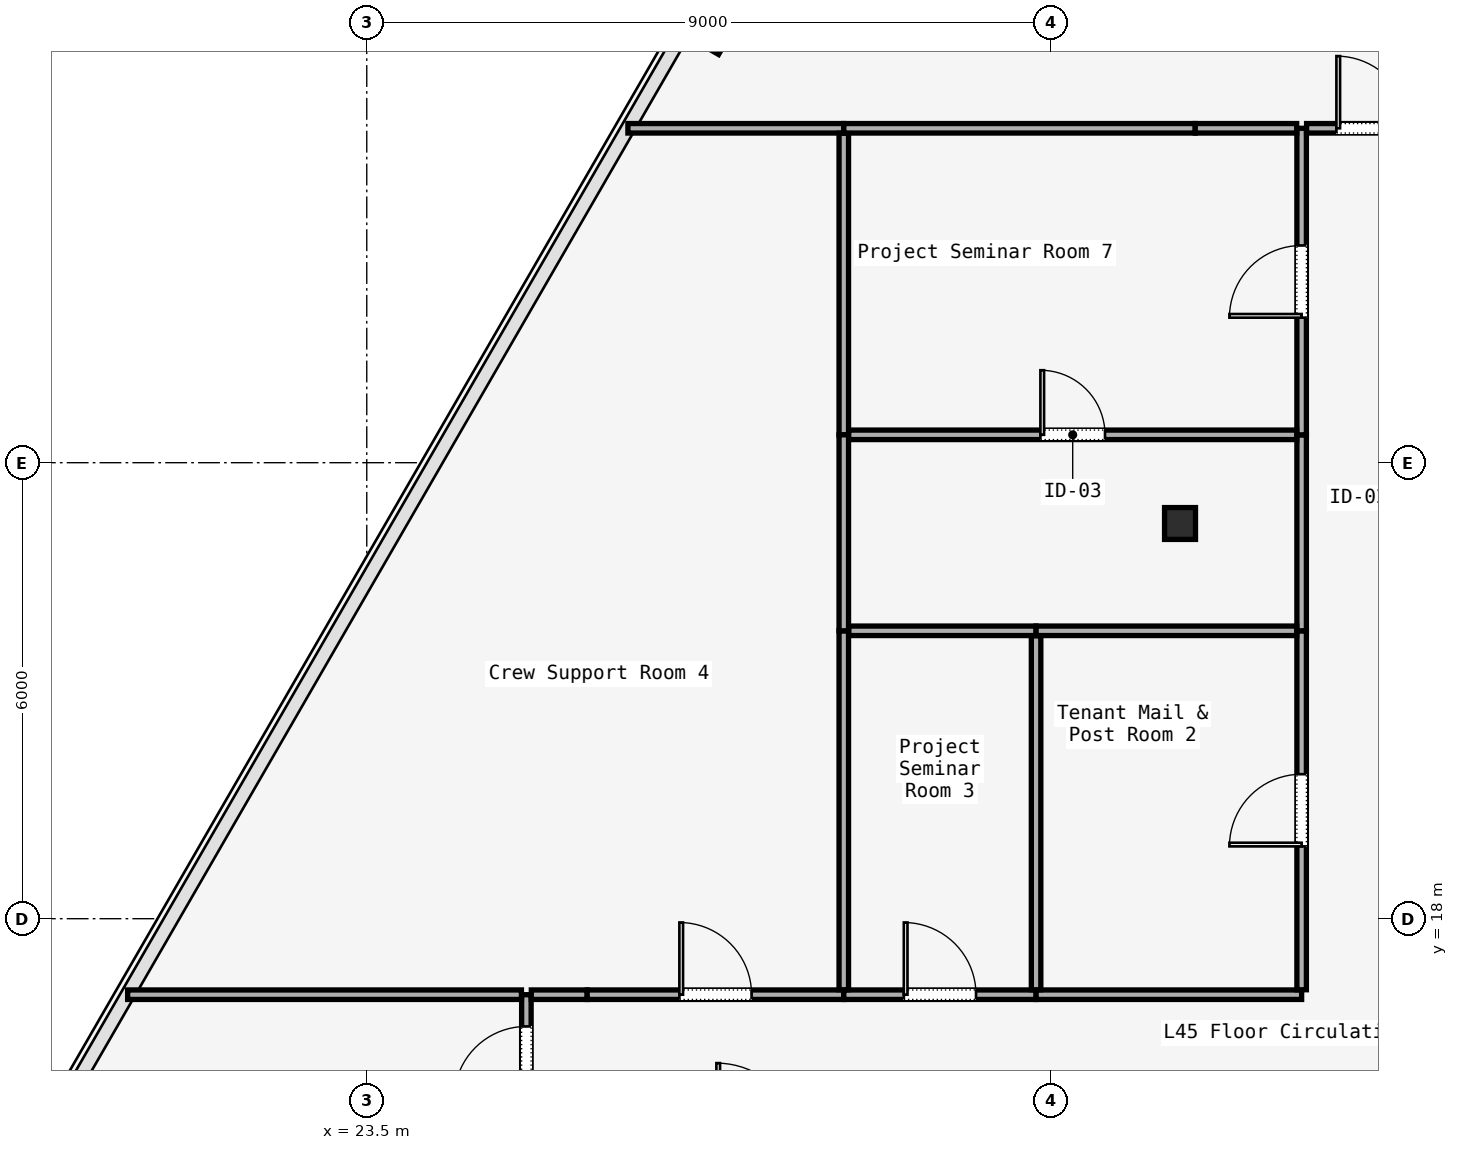
"""IFC4 building model, lengths in metres.
Left out: names, types, materials, properties, quantities, classifications, styles, units other than length and angle.
Written with IfcOpenShell. Run it as: python <this file> out.ifc"""

import sys

from ifc_helpers import new_model, si_unit, direction, frame, frame_2d, origin, origin_2d, place, context, subcontext, project, spatial, rectangle, i_section, extrude, element, fill, save


model = new_model("IFC4")
c1 = context("Model", 3, precision=1e-05, world=origin(), true_north=direction((0.0, 1.0)))
c2 = subcontext(c1, "Body", "Model", "MODEL_VIEW")
j1 = project(units=[si_unit("LENGTHUNIT", "METRE"), si_unit("PLANEANGLEUNIT", "RADIAN")], contexts=[c1])
p1 = place(None, origin())
s1 = spatial("IfcSite", under=j1, at=p1, CompositionType="ELEMENT")
p2 = place(p1, origin())
s2 = spatial("IfcBuilding", under=s1, at=p2, CompositionType="ELEMENT")
p3 = place(p2, frame((0.0, 0.0, 187.8)))
s3 = spatial("IfcBuildingStorey", under=s2, at=p3, CompositionType="ELEMENT", Elevation=187.8)
p4 = place(p3, frame((34.2, 23.2, 0.0), z_axis=(0.0, 0.0, 1.0), x_axis=(1.0, 0.0, 0.0)))
e1 = element("IfcColumn", 1, at=p4, inside=s3, PredefinedType="COLUMN", context=c2, shape_type="SweptSolid", body=[
    extrude(i_section(OverallWidth=0.407, OverallDepth=0.419, WebThickness=0.031, FlangeThickness=0.049, FilletRadius=0.015, at=origin_2d()), origin(), (0.0, 0.0, 1.0), 3.58),
])
p5 = place(p3, frame((28.036, 29.666, 0.0), z_axis=(0.042672352405, -0.073997120652, 0.996345068977), x_axis=(0.002087206944, 0.997257873333, 0.073975520569)))
e2 = element("IfcColumn", 2, at=p5, inside=s3, PredefinedType="COLUMN", context=c2, shape_type="SweptSolid", body=[
    extrude(i_section(OverallWidth=0.418, OverallDepth=0.455, WebThickness=0.042, FlangeThickness=0.052, FilletRadius=0.015, at=origin_2d()), origin(), (0.0, 0.0, 1.0), 3.593),
])
p6 = place(p3, frame((25.6, 15.215, 0.0), z_axis=(0.0, 0.0, 1.0), x_axis=(0.0, 1.0, 0.0)))
e3 = element("IfcWall", 3, at=p6, inside=s3, PredefinedType="PARTITIONING", context=c2, shape_type="SweptSolid", body=[
    extrude(rectangle(XDim=1.785, YDim=0.125, at=frame_2d((0.893, 0.0))), origin(), (0.0, 0.0, 1.0), 3.01),
])
p7 = place(p6, frame((0.417, 0.0, 0.0)))
e4 = element("IfcOpeningElement", 4, at=p7, cuts=e3, PredefinedType="OPENING", context=c2, shape_type="SweptSolid", body=[
    extrude(rectangle(XDim=0.95, YDim=2.2, at=frame_2d((0.475, 1.1))), frame((0.0, 0.062, 0.0), z_axis=(0.0, -1.0, 0.0), x_axis=(1.0, 0.0, 0.0)), (0.0, 0.0, 1.0), 0.125),
])
p8 = place(p3, frame((25.665, 17.0, 0.0), z_axis=(0.0, 0.0, 1.0), x_axis=(1.0, 0.0, 0.0)))
e5 = element("IfcWall", 5, at=p8, inside=s3, PredefinedType="PARTITIONING", context=c2, shape_type="SweptSolid", body=[
    extrude(rectangle(XDim=0.735, YDim=0.125, at=frame_2d((0.367, 0.0))), origin(), (0.0, 0.0, 1.0), 3.01),
])
p9 = place(p3, frame((26.4, 17.0, 0.0), z_axis=(0.0, 0.0, 1.0), x_axis=(1.0, 0.0, 0.0)))
e6 = element("IfcWall", 6, at=p9, inside=s3, PredefinedType="PARTITIONING", context=c2, shape_type="SweptSolid", body=[
    extrude(rectangle(XDim=3.376, YDim=0.125, at=frame_2d((1.688, 0.0))), origin(), (0.0, 0.0, 1.0), 3.01),
])
p10 = place(p9, frame((1.213, 0.0, 0.0)))
e7 = element("IfcOpeningElement", 7, at=p10, cuts=e6, PredefinedType="OPENING", context=c2, shape_type="SweptSolid", body=[
    extrude(rectangle(XDim=0.95, YDim=2.2, at=frame_2d((0.475, 1.1))), frame((0.0, 0.062, 0.0), z_axis=(0.0, -1.0, 0.0), x_axis=(1.0, 0.0, 0.0)), (0.0, 0.0, 1.0), 0.125),
])
p11 = place(p3, frame((29.776, 17.0, 0.0), z_axis=(0.0, 0.0, 1.0), x_axis=(1.0, 0.0, 0.0)))
e8 = element("IfcWall", 8, at=p11, inside=s3, PredefinedType="PARTITIONING", context=c2, shape_type="SweptSolid", body=[
    extrude(rectangle(XDim=2.53, YDim=0.125, at=frame_2d((1.265, 0.0))), origin(), (0.0, 0.0, 1.0), 3.01),
])
p12 = place(p11, frame((0.79, 0.0, 0.0)))
e9 = element("IfcOpeningElement", 9, at=p12, cuts=e8, PredefinedType="OPENING", context=c2, shape_type="SweptSolid", body=[
    extrude(rectangle(XDim=0.95, YDim=2.2, at=frame_2d((0.475, 1.1))), frame((0.0, 0.062, 0.0), z_axis=(0.0, -1.0, 0.0), x_axis=(1.0, 0.0, 0.0)), (0.0, 0.0, 1.0), 0.125),
])
p13 = place(p3, frame((32.306, 17.0, 0.0), z_axis=(0.0, 0.0, 1.0), x_axis=(1.0, 0.0, 0.0)))
e10 = element("IfcWall", 10, at=p13, inside=s3, PredefinedType="PARTITIONING", context=c2, shape_type="SweptSolid", body=[
    extrude(rectangle(XDim=3.494, YDim=0.125, at=frame_2d((1.747, 0.0))), origin(), (0.0, 0.0, 1.0), 3.01),
])
p14 = place(p3, frame((35.8, 17.065, 0.0), z_axis=(0.0, 0.0, 1.0), x_axis=(0.0, 1.0, 0.0)))
e11 = element("IfcWall", 11, at=p14, inside=s3, PredefinedType="PARTITIONING", context=c2, shape_type="SweptSolid", body=[
    extrude(rectangle(XDim=4.723, YDim=0.125, at=frame_2d((2.362, 0.0))), origin(), (0.0, 0.0, 1.0), 3.01),
])
p15 = place(p14, frame((1.886, 0.0, 0.0)))
e12 = element("IfcOpeningElement", 12, at=p15, cuts=e11, PredefinedType="OPENING", context=c2, shape_type="SweptSolid", body=[
    extrude(rectangle(XDim=0.95, YDim=2.2, at=frame_2d((0.475, 1.1))), frame((0.0, 0.062, 0.0), z_axis=(0.0, -1.0, 0.0), x_axis=(1.0, 0.0, 0.0)), (0.0, 0.0, 1.0), 0.125),
])
p16 = place(p3, frame((35.8, 21.788, 0.0), z_axis=(0.0, 0.0, 1.0), x_axis=(0.0, 1.0, 0.0)))
e13 = element("IfcWall", 13, at=p16, inside=s3, PredefinedType="PARTITIONING", context=c2, shape_type="SweptSolid", body=[
    extrude(rectangle(XDim=2.579, YDim=0.125, at=frame_2d((1.289, 0.0))), origin(), (0.0, 0.0, 1.0), 3.01),
])
p17 = place(p3, frame((35.8, 24.367, 0.0), z_axis=(0.0, 0.0, 1.0), x_axis=(0.0, 1.0, 0.0)))
e14 = element("IfcWall", 14, at=p17, inside=s3, PredefinedType="PARTITIONING", context=c2, shape_type="SweptSolid", body=[
    extrude(rectangle(XDim=4.033, YDim=0.125, at=frame_2d((2.017, 0.0))), origin(), (0.0, 0.0, 1.0), 3.01),
])
p18 = place(p17, frame((1.542, 0.0, 0.0)))
e15 = element("IfcOpeningElement", 15, at=p18, cuts=e14, PredefinedType="OPENING", context=c2, shape_type="SweptSolid", body=[
    extrude(rectangle(XDim=0.95, YDim=2.2, at=frame_2d((0.475, 1.1))), frame((0.0, 0.062, 0.0), z_axis=(0.0, -1.0, 0.0), x_axis=(1.0, 0.0, 0.0)), (0.0, 0.0, 1.0), 0.125),
])
p19 = place(p3, frame((35.865, 28.4, 0.0), z_axis=(0.0, 0.0, 1.0), x_axis=(1.0, 0.0, 0.0)))
e16 = element("IfcWall", 16, at=p19, inside=s3, PredefinedType="PARTITIONING", context=c2, shape_type="SweptSolid", body=[
    extrude(rectangle(XDim=1.735, YDim=0.125, at=frame_2d((0.868, 0.0))), origin(), (0.0, 0.0, 1.0), 3.01),
])
p20 = place(p19, frame((0.393, 0.0, 0.0)))
e17 = element("IfcOpeningElement", 17, at=p20, cuts=e16, PredefinedType="OPENING", context=c2, shape_type="SweptSolid", body=[
    extrude(rectangle(XDim=0.95, YDim=2.2, at=frame_2d((0.475, 1.1))), frame((0.0, 0.062, 0.0), z_axis=(0.0, -1.0, 0.0), x_axis=(1.0, 0.0, 0.0)), (0.0, 0.0, 1.0), 0.125),
])
p21 = place(p3, frame((20.354, 17.0, 0.0), z_axis=(0.0, 0.0, 1.0), x_axis=(1.0, 0.0, 0.0)))
e18 = element("IfcWall", 18, at=p21, inside=s3, PredefinedType="PARTITIONING", context=c2, shape_type="SweptSolid", body=[
    extrude(rectangle(XDim=5.181, YDim=0.125, at=frame_2d((2.59, 0.0))), origin(), (0.0, 0.0, 1.0), 3.01),
])
p22 = place(p3, frame((29.776, 17.065, 0.0), z_axis=(0.0, 0.0, 1.0), x_axis=(0.0, 1.0, 0.0)))
e19 = element("IfcWall", 19, at=p22, inside=s3, PredefinedType="PARTITIONING", context=c2, shape_type="SweptSolid", body=[
    extrude(rectangle(XDim=4.723, YDim=0.125, at=frame_2d((2.362, 0.0))), origin(), (0.0, 0.0, 1.0), 3.01),
])
p23 = place(p3, frame((29.841, 21.788, 0.0), z_axis=(0.0, 0.0, 1.0), x_axis=(1.0, 0.0, 0.0)))
e20 = element("IfcWall", 20, at=p23, inside=s3, PredefinedType="PARTITIONING", context=c2, shape_type="SweptSolid", body=[
    extrude(rectangle(XDim=2.465, YDim=0.125, at=frame_2d((1.232, 0.0))), origin(), (0.0, 0.0, 1.0), 3.01),
])
p24 = place(p3, frame((32.306, 21.723, 0.0), z_axis=(0.0, 0.0, 1.0), x_axis=(0.0, -1.0, 0.0)))
e21 = element("IfcWall", 21, at=p24, inside=s3, PredefinedType="PARTITIONING", context=c2, shape_type="SweptSolid", body=[
    extrude(rectangle(XDim=4.658, YDim=0.125, at=frame_2d((2.329, 0.0))), origin(), (0.0, 0.0, 1.0), 3.01),
])
p25 = place(p3, frame((32.306, 21.788, 0.0), z_axis=(0.0, 0.0, 1.0), x_axis=(1.0, 0.0, 0.0)))
e22 = element("IfcWall", 22, at=p25, inside=s3, PredefinedType="PARTITIONING", context=c2, shape_type="SweptSolid", body=[
    extrude(rectangle(XDim=3.429, YDim=0.125, at=frame_2d((1.714, 0.0))), origin(), (0.0, 0.0, 1.0), 3.01),
])
p26 = place(p3, frame((26.936, 28.4, 0.0), z_axis=(0.0, 0.0, 1.0), x_axis=(1.0, 0.0, 0.0)))
e23 = element("IfcWall", 23, at=p26, inside=s3, PredefinedType="PARTITIONING", context=c2, shape_type="SweptSolid", body=[
    extrude(rectangle(XDim=2.84, YDim=0.125, at=frame_2d((1.42, 0.0))), origin(), (0.0, 0.0, 1.0), 3.01),
])
p27 = place(p3, frame((29.776, 28.335, 0.0), z_axis=(0.0, 0.0, 1.0), x_axis=(0.0, -1.0, 0.0)))
e24 = element("IfcWall", 24, at=p27, inside=s3, PredefinedType="PARTITIONING", context=c2, shape_type="SweptSolid", body=[
    extrude(rectangle(XDim=3.968, YDim=0.125, at=frame_2d((1.984, 0.0))), origin(), (0.0, 0.0, 1.0), 3.01),
])
p28 = place(p3, frame((29.776, 24.367, 0.0), z_axis=(0.0, 0.0, 1.0), x_axis=(0.0, -1.0, 0.0)))
e25 = element("IfcWall", 25, at=p28, inside=s3, PredefinedType="PARTITIONING", context=c2, shape_type="SweptSolid", body=[
    extrude(rectangle(XDim=2.579, YDim=0.125, at=frame_2d((1.289, 0.0))), origin(), (0.0, 0.0, 1.0), 3.01),
])
p29 = place(p3, frame((29.841, 24.367, 0.0), z_axis=(0.0, 0.0, 1.0), x_axis=(1.0, 0.0, 0.0)))
e26 = element("IfcWall", 26, at=p29, inside=s3, PredefinedType="PARTITIONING", context=c2, shape_type="SweptSolid", body=[
    extrude(rectangle(XDim=5.894, YDim=0.125, at=frame_2d((2.947, 0.0))), origin(), (0.0, 0.0, 1.0), 3.01),
])
p30 = place(p29, frame((2.522, 0.0, 0.0)))
e27 = element("IfcOpeningElement", 27, at=p30, cuts=e26, PredefinedType="OPENING", context=c2, shape_type="SweptSolid", body=[
    extrude(rectangle(XDim=0.85, YDim=2.15, at=frame_2d((0.425, 1.075))), frame((0.0, 0.062, 0.0), z_axis=(0.0, -1.0, 0.0), x_axis=(1.0, 0.0, 0.0)), (0.0, 0.0, 1.0), 0.125),
])
p31 = place(p3, frame((29.776, 28.4, 0.0), z_axis=(0.0, 0.0, 1.0), x_axis=(1.0, 0.0, 0.0)))
e28 = element("IfcWall", 28, at=p31, inside=s3, PredefinedType="PARTITIONING", context=c2, shape_type="SweptSolid", body=[
    extrude(rectangle(XDim=4.624, YDim=0.125, at=frame_2d((2.312, 0.0))), origin(), (0.0, 0.0, 1.0), 3.01),
])
p32 = place(p3, frame((34.4, 28.4, 0.0), z_axis=(0.0, 0.0, 1.0), x_axis=(1.0, 0.0, 0.0)))
e29 = element("IfcWall", 29, at=p32, inside=s3, PredefinedType="PARTITIONING", context=c2, shape_type="SweptSolid", body=[
    extrude(rectangle(XDim=1.335, YDim=0.125, at=frame_2d((0.667, 0.0))), origin(), (0.0, 0.0, 1.0), 3.01),
])
p33 = place(p7, origin())
e30 = element("IfcDoor", 30, at=p33, inside=s3, OperationType="SINGLE_SWING_RIGHT", PredefinedType="DOOR", context=c2, shape_type="SweptSolid", body=[
    extrude(rectangle(XDim=0.95, YDim=2.2, at=frame_2d((0.475, 1.1))), frame((0.0, 0.025, 0.0), z_axis=(0.0, -1.0, 0.0), x_axis=(1.0, 0.0, 0.0)), (0.0, 0.0, 1.0), 0.05),
])
fill(e4, e30)
p34 = place(p12, origin())
e31 = element("IfcDoor", 31, at=p34, inside=s3, OperationType="SINGLE_SWING_LEFT", PredefinedType="DOOR", context=c2, shape_type="SweptSolid", body=[
    extrude(rectangle(XDim=0.95, YDim=2.2, at=frame_2d((0.475, 1.1))), frame((0.0, 0.025, 0.0), z_axis=(0.0, -1.0, 0.0), x_axis=(1.0, 0.0, 0.0)), (0.0, 0.0, 1.0), 0.05),
])
fill(e9, e31)
p35 = place(p15, origin())
e32 = element("IfcDoor", 32, at=p35, inside=s3, OperationType="SINGLE_SWING_RIGHT", PredefinedType="DOOR", context=c2, shape_type="SweptSolid", body=[
    extrude(rectangle(XDim=0.95, YDim=2.2, at=frame_2d((0.475, 1.1))), frame((0.0, 0.025, 0.0), z_axis=(0.0, -1.0, 0.0), x_axis=(1.0, 0.0, 0.0)), (0.0, 0.0, 1.0), 0.05),
])
fill(e12, e32)
p36 = place(p10, origin())
e33 = element("IfcDoor", 33, at=p36, inside=s3, OperationType="SINGLE_SWING_LEFT", PredefinedType="DOOR", context=c2, shape_type="SweptSolid", body=[
    extrude(rectangle(XDim=0.95, YDim=2.2, at=frame_2d((0.475, 1.1))), frame((0.0, 0.025, 0.0), z_axis=(0.0, -1.0, 0.0), x_axis=(1.0, 0.0, 0.0)), (0.0, 0.0, 1.0), 0.05),
])
fill(e7, e33)
p37 = place(p30, origin())
e34 = element("IfcDoor", 34, at=p37, inside=s3, OperationType="SINGLE_SWING_LEFT", PredefinedType="DOOR", context=c2, shape_type="SweptSolid", body=[
    extrude(rectangle(XDim=0.85, YDim=2.15, at=frame_2d((0.425, 1.075))), frame((0.0, 0.025, 0.0), z_axis=(0.0, -1.0, 0.0), x_axis=(1.0, 0.0, 0.0)), (0.0, 0.0, 1.0), 0.05),
])
fill(e27, e34)
p38 = place(p18, origin())
e35 = element("IfcDoor", 35, at=p38, inside=s3, OperationType="SINGLE_SWING_LEFT", PredefinedType="DOOR", context=c2, shape_type="SweptSolid", body=[
    extrude(rectangle(XDim=0.95, YDim=2.2, at=frame_2d((0.475, 1.1))), frame((0.0, 0.025, 0.0), z_axis=(0.0, -1.0, 0.0), x_axis=(1.0, 0.0, 0.0)), (0.0, 0.0, 1.0), 0.05),
])
fill(e15, e35)
p39 = place(p20, origin())
e36 = element("IfcDoor", 36, at=p39, inside=s3, OperationType="SINGLE_SWING_LEFT", PredefinedType="DOOR", context=c2, shape_type="SweptSolid", body=[
    extrude(rectangle(XDim=0.95, YDim=2.2, at=frame_2d((0.475, 1.1))), frame((0.0, 0.025, 0.0), z_axis=(0.0, -1.0, 0.0), x_axis=(1.0, 0.0, 0.0)), (0.0, 0.0, 1.0), 0.05),
])
fill(e17, e36)
save(model, sys.argv[1])
